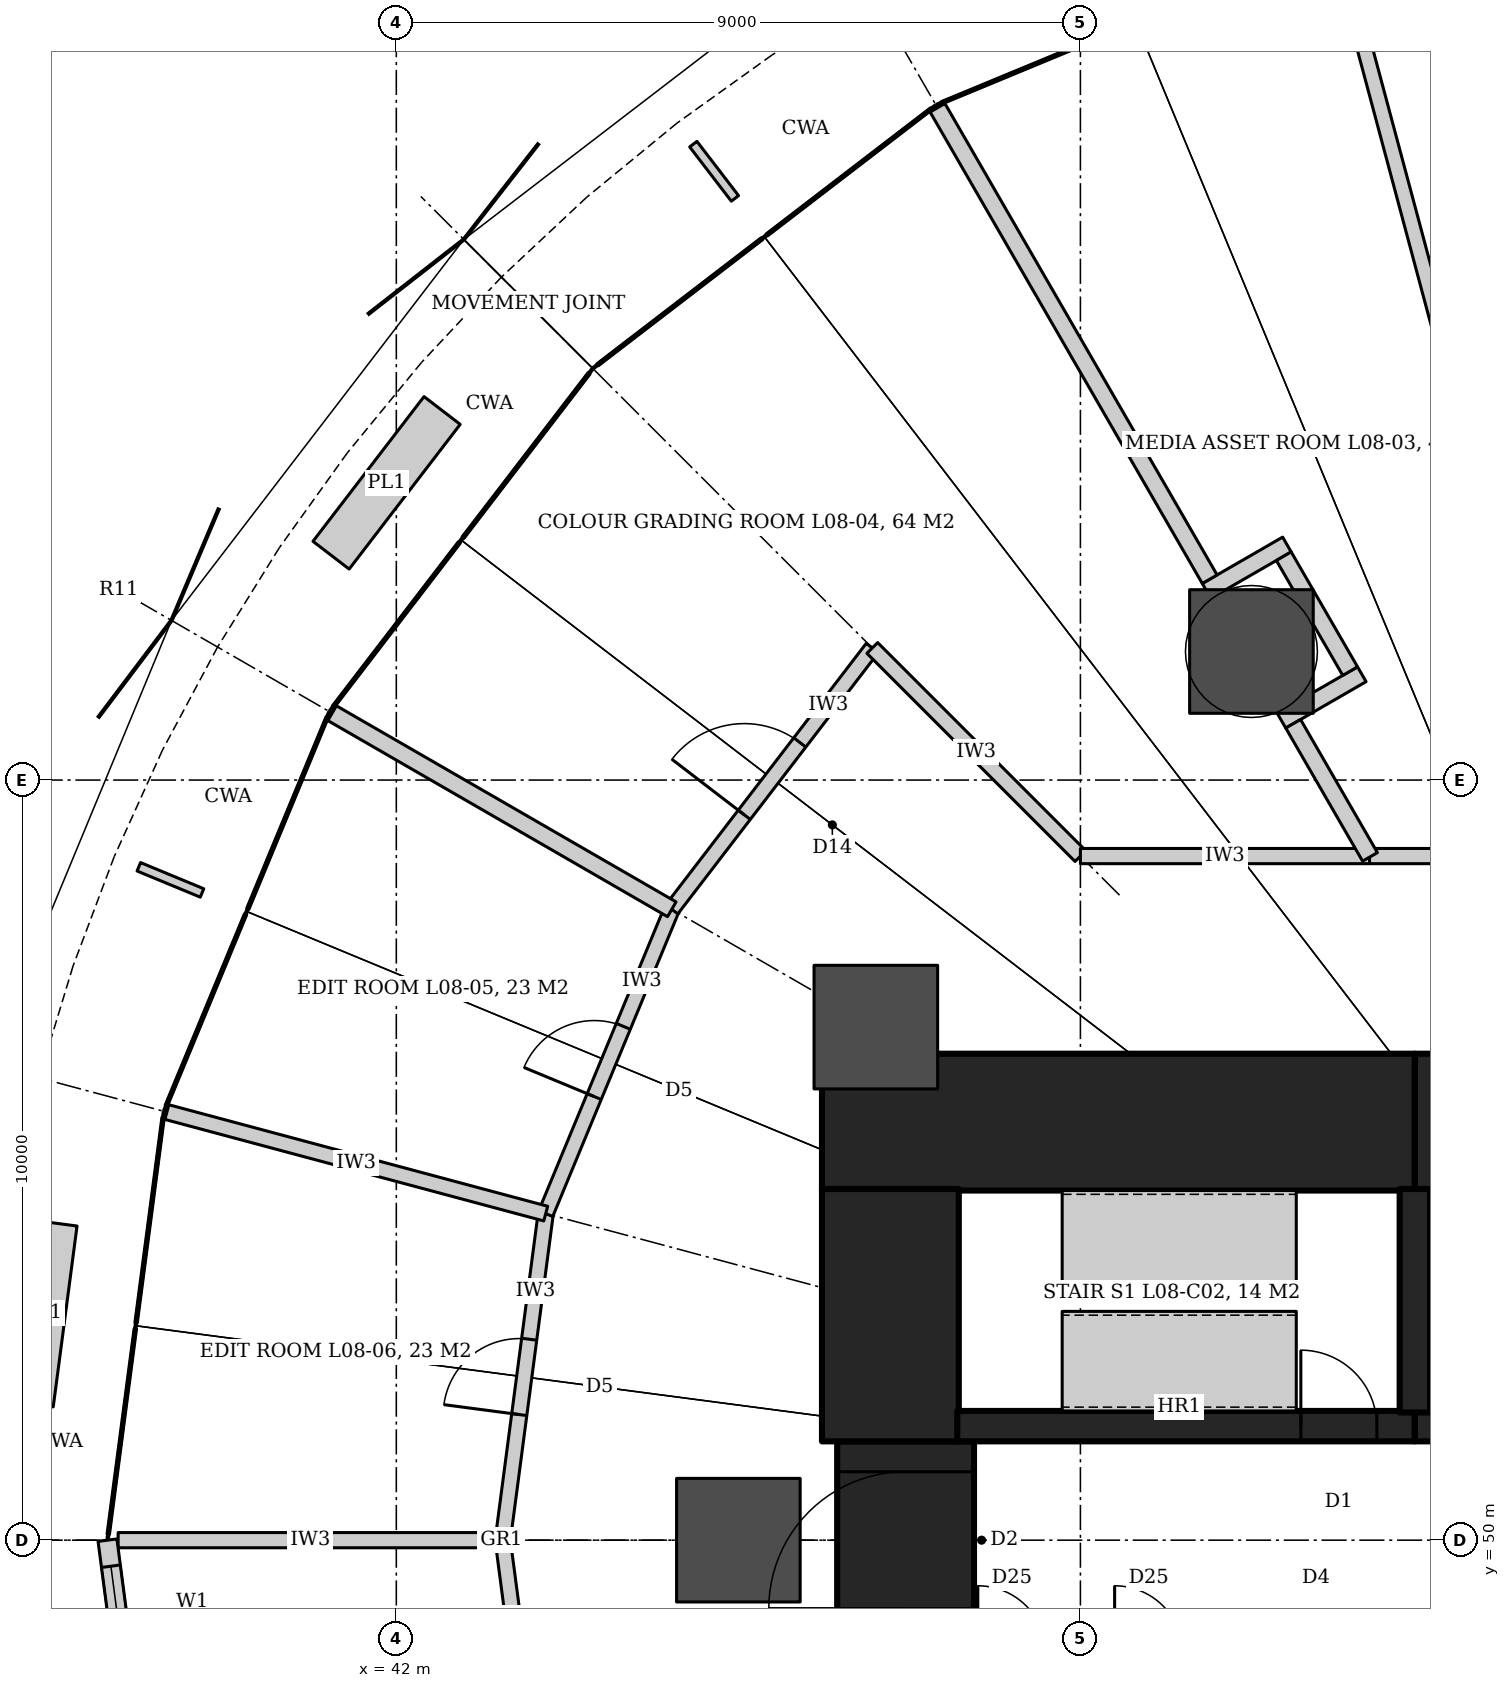
"""IFC4 building model, lengths in metres.
Left out: names, types, materials, properties, quantities, classifications, styles, units other than length and angle.
Written with IfcOpenShell. Run it as: python <this file> out.ifc"""

import sys

from ifc_helpers import new_model, si_unit, direction, frame, frame_2d, origin, origin_2d, place, context, subcontext, project, spatial, rectangle, hollow_circle, extrude, element, fill, save


model = new_model("IFC4")
c1 = context("Model", 3, precision=1e-05, world=origin(), true_north=direction((0.0, 1.0)))
c2 = subcontext(c1, "Body", "Model", "MODEL_VIEW")
j1 = project(units=[si_unit("LENGTHUNIT", "METRE"), si_unit("PLANEANGLEUNIT", "RADIAN")], contexts=[c1])
p1 = place(None, origin())
s1 = spatial("IfcSite", under=j1, at=p1, CompositionType="ELEMENT")
p2 = place(p1, origin())
s2 = spatial("IfcBuilding", under=s1, at=p2, CompositionType="ELEMENT")
p3 = place(p2, frame((0.0, 0.0, 42.8)))
s3 = spatial("IfcBuildingStorey", under=s2, at=p3, CompositionType="ELEMENT", Elevation=42.8)
p4 = place(p3, frame((47.6, 55.5, 0.0), z_axis=(0.0, 0.0, 1.0), x_axis=(1.0, 0.0, 0.0)))
e1 = element("IfcWall", 1, at=p4, inside=s3, PredefinedType="SHEAR", context=c2, shape_type="SweptSolid", body=[
    extrude(rectangle(XDim=7.8, YDim=1.8, at=frame_2d((3.9, 0.0))), origin(), (0.0, 0.0, 1.0), 4.2),
])
p5 = place(p3, frame((55.4, 55.5, 0.0), z_axis=(0.0, 0.0, 1.0), x_axis=(1.0, 0.0, 0.0)))
e2 = element("IfcWall", 2, at=p5, inside=s3, PredefinedType="SHEAR", context=c2, shape_type="SweptSolid", body=[
    extrude(rectangle(XDim=9.2, YDim=1.8, at=frame_2d((4.6, 0.0))), origin(), (0.0, 0.0, 1.0), 4.2),
])
p6 = place(p3, frame((48.7, 48.7, 0.0), z_axis=(0.0, 0.0, 1.0), x_axis=(0.0, 1.0, 0.0)))
e3 = element("IfcWall", 3, at=p6, inside=s3, PredefinedType="SHEAR", context=c2, shape_type="SweptSolid", body=[
    extrude(rectangle(XDim=2.6, YDim=1.8, at=frame_2d((1.3, 0.0))), origin(), (0.0, 0.0, 1.0), 4.2),
])
p7 = place(p6, frame((0.4, 0.0, 0.0)))
e4 = element("IfcOpeningElement", 4, at=p7, cuts=e3, PredefinedType="OPENING", context=c2, shape_type="SweptSolid", body=[
    extrude(rectangle(XDim=1.8, YDim=2.1, at=frame_2d((0.9, 1.05))), frame((0.0, 0.91, 0.0), z_axis=(0.0, -1.0, 0.0), x_axis=(1.0, 0.0, 0.0)), (0.0, 0.0, 1.0), 1.82),
])
p8 = place(p3, frame((48.5, 51.3, 0.0), z_axis=(0.0, 0.0, 1.0), x_axis=(0.0, 1.0, 0.0)))
e5 = element("IfcWall", 5, at=p8, inside=s3, PredefinedType="SHEAR", context=c2, shape_type="SweptSolid", body=[
    extrude(rectangle(XDim=3.32, YDim=1.8, at=frame_2d((1.66, 0.0))), origin(), (0.0, 0.0, 1.0), 4.2),
])
p9 = place(p3, frame((49.38, 51.5, 0.0), z_axis=(0.0, 0.0, 1.0), x_axis=(1.0, 0.0, 0.0)))
e6 = element("IfcWall", 6, at=p9, inside=s3, PredefinedType="SHEAR", context=c2, shape_type="SweptSolid", body=[
    extrude(rectangle(XDim=6.02, YDim=0.4, at=frame_2d((3.01, 0.0))), origin(), (0.0, 0.0, 1.0), 4.2),
])
p10 = place(p9, frame((4.52, 0.0, 0.0)))
e7 = element("IfcOpeningElement", 7, at=p10, cuts=e6, PredefinedType="OPENING", context=c2, shape_type="SweptSolid", body=[
    extrude(rectangle(XDim=1.0, YDim=2.1, at=frame_2d((0.5, 1.05))), frame((0.0, 0.21, 0.0), z_axis=(0.0, -1.0, 0.0), x_axis=(1.0, 0.0, 0.0)), (0.0, 0.0, 1.0), 0.42),
])
p11 = place(p3, frame((55.4, 51.5, 0.0), z_axis=(0.0, 0.0, 1.0), x_axis=(1.0, 0.0, 0.0)))
e8 = element("IfcWall", 8, at=p11, inside=s3, PredefinedType="SHEAR", context=c2, shape_type="SweptSolid", body=[
    extrude(rectangle(XDim=9.2, YDim=0.4, at=frame_2d((4.6, 0.0))), origin(), (0.0, 0.0, 1.0), 4.2),
])
p12 = place(p11, frame((0.6, 0.0, 0.0)))
e9 = element("IfcOpeningElement", 9, at=p12, cuts=e8, PredefinedType="OPENING", context=c2, shape_type="SweptSolid", body=[
    extrude(rectangle(XDim=1.1, YDim=2.1, at=frame_2d((0.55, 1.05))), frame((0.0, 0.21, 0.0), z_axis=(0.0, -1.0, 0.0), x_axis=(1.0, 0.0, 0.0)), (0.0, 0.0, 1.0), 0.42),
])
p13 = place(p11, frame((2.9, 0.0, 0.0)))
e10 = element("IfcOpeningElement", 10, at=p13, cuts=e8, PredefinedType="OPENING", context=c2, shape_type="SweptSolid", body=[
    extrude(rectangle(XDim=1.1, YDim=2.1, at=frame_2d((0.55, 1.05))), frame((0.0, 0.21, 0.0), z_axis=(0.0, -1.0, 0.0), x_axis=(1.0, 0.0, 0.0)), (0.0, 0.0, 1.0), 0.42),
])
p14 = place(p11, frame((5.2, 0.0, 0.0)))
e11 = element("IfcOpeningElement", 11, at=p14, cuts=e8, PredefinedType="OPENING", context=c2, shape_type="SweptSolid", body=[
    extrude(rectangle(XDim=1.1, YDim=2.1, at=frame_2d((0.55, 1.05))), frame((0.0, 0.21, 0.0), z_axis=(0.0, -1.0, 0.0), x_axis=(1.0, 0.0, 0.0)), (0.0, 0.0, 1.0), 0.42),
])
p15 = place(p11, frame((7.5, 0.0, 0.0)))
e12 = element("IfcOpeningElement", 12, at=p15, cuts=e8, PredefinedType="OPENING", context=c2, shape_type="SweptSolid", body=[
    extrude(rectangle(XDim=1.1, YDim=2.1, at=frame_2d((0.55, 1.05))), frame((0.0, 0.21, 0.0), z_axis=(0.0, -1.0, 0.0), x_axis=(1.0, 0.0, 0.0)), (0.0, 0.0, 1.0), 0.42),
])
p16 = place(p3, frame((55.4, 51.68, 0.0), z_axis=(0.0, 0.0, 1.0), x_axis=(0.0, 1.0, 0.0)))
e13 = element("IfcWall", 13, at=p16, inside=s3, PredefinedType="SHEAR", context=c2, shape_type="SweptSolid", body=[
    extrude(rectangle(XDim=2.94, YDim=0.4, at=frame_2d((1.47, 0.0))), origin(), (0.0, 0.0, 1.0), 4.2),
])
for number, where, z_axis, x_axis in (
    (14, (53.25, 61.691, 0.0), (0.0, 0.0, 1.0), (1.0, 0.0, 0.0)),
    (15, (48.309, 56.75, 0.0), (0.0, 0.0, 1.0), (1.0, 0.0, 0.0)),
    (16, (46.5, 50.0, 0.0), (0.0, 0.0, 1.0), (1.0, 0.0, 0.0)),
):
    element("IfcColumn", number, at=place(p3, frame(where, z_axis=z_axis, x_axis=x_axis)), inside=s3, PredefinedType="COLUMN", context=c2, shape_type="SweptSolid", body=[
        extrude(hollow_circle(Radius=0.813, WallThickness=0.08, at=origin_2d()), origin(), (0.0, 0.0, 1.0), 4.2),
    ])
p17 = place(p3, frame((43.966, 45.704, 0.0), z_axis=(0.0, 0.0, 1.0), x_axis=(-0.130536124221, 0.99144355375, 0.0)))
e17 = element("IfcWall", 17, at=p17, inside=s3, PredefinedType="PARTITIONING", context=c2, shape_type="SweptSolid", body=[
    extrude(rectangle(XDim=4.333, YDim=0.2, at=frame_2d((2.167, 0.0))), origin(), (0.0, 0.0, 1.0), 3.04),
])
p18 = place(p17, frame((1.667, 0.0, 0.0)))
e18 = element("IfcOpeningElement", 18, at=p18, cuts=e17, PredefinedType="OPENING", context=c2, shape_type="SweptSolid", body=[
    extrude(rectangle(XDim=1.0, YDim=2.1, at=frame_2d((0.5, 1.05))), frame((0.0, 0.11, 0.0), z_axis=(0.0, -1.0, 0.0), x_axis=(1.0, 0.0, 0.0)), (0.0, 0.0, 1.0), 0.22),
])
p19 = place(p3, frame((43.4, 50.0, 0.0), z_axis=(0.0, 0.0, 1.0), x_axis=(0.130536124221, 0.99144355375, 0.0)))
e19 = element("IfcWall", 19, at=p19, inside=s3, PredefinedType="PARTITIONING", context=c2, shape_type="SweptSolid", body=[
    extrude(rectangle(XDim=4.333, YDim=0.2, at=frame_2d((2.167, 0.0))), origin(), (0.0, 0.0, 1.0), 3.04),
])
p20 = place(p19, frame((1.667, 0.0, 0.0)))
e20 = element("IfcOpeningElement", 20, at=p20, cuts=e19, PredefinedType="OPENING", context=c2, shape_type="SweptSolid", body=[
    extrude(rectangle(XDim=1.0, YDim=2.1, at=frame_2d((0.5, 1.05))), frame((0.0, 0.11, 0.0), z_axis=(0.0, -1.0, 0.0), x_axis=(1.0, 0.0, 0.0)), (0.0, 0.0, 1.0), 0.22),
])
p21 = place(p3, frame((43.966, 54.296, 0.0), z_axis=(0.0, 0.0, 1.0), x_axis=(0.382698425325, 0.923873322082, 0.0)))
e21 = element("IfcWall", 21, at=p21, inside=s3, PredefinedType="PARTITIONING", context=c2, shape_type="SweptSolid", body=[
    extrude(rectangle(XDim=4.333, YDim=0.2, at=frame_2d((2.167, 0.0))), origin(), (0.0, 0.0, 1.0), 3.04),
])
p22 = place(p21, frame((1.667, 0.0, 0.0)))
e22 = element("IfcOpeningElement", 22, at=p22, cuts=e21, PredefinedType="OPENING", context=c2, shape_type="SweptSolid", body=[
    extrude(rectangle(XDim=1.0, YDim=2.1, at=frame_2d((0.5, 1.05))), frame((0.0, 0.11, 0.0), z_axis=(0.0, -1.0, 0.0), x_axis=(1.0, 0.0, 0.0)), (0.0, 0.0, 1.0), 0.22),
])
p23 = place(p3, frame((45.624, 58.3, 0.0), z_axis=(0.0, 0.0, 1.0), x_axis=(0.60874374674, 0.79336690806, 0.0)))
e23 = element("IfcWall", 23, at=p23, inside=s3, PredefinedType="PARTITIONING", context=c2, shape_type="SweptSolid", body=[
    extrude(rectangle(XDim=4.333, YDim=0.2, at=frame_2d((2.167, 0.0))), origin(), (0.0, 0.0, 1.0), 3.04),
])
p24 = place(p23, frame((1.567, 0.0, 0.0)))
e24 = element("IfcOpeningElement", 24, at=p24, cuts=e23, PredefinedType="OPENING", context=c2, shape_type="SweptSolid", body=[
    extrude(rectangle(XDim=1.2, YDim=2.4, at=frame_2d((0.6, 1.2))), frame((0.0, 0.11, 0.0), z_axis=(0.0, -1.0, 0.0), x_axis=(1.0, 0.0, 0.0)), (0.0, 0.0, 1.0), 0.22),
])
p25 = place(p3, frame((48.262, 61.738, 0.0), z_axis=(0.0, 0.0, 1.0), x_axis=(0.707106781187, -0.707106781187, 0.0)))
e25 = element("IfcWall", 25, at=p25, inside=s3, PredefinedType="PARTITIONING", context=c2, shape_type="SweptSolid", body=[
    extrude(rectangle(XDim=3.872, YDim=0.2, at=frame_2d((1.936, 0.0))), origin(), (0.0, 0.0, 1.0), 3.02),
])
p26 = place(p3, frame((51.0, 59.0, 0.0), z_axis=(0.0, 0.0, 1.0), x_axis=(1.0, 0.0, 0.0)))
e26 = element("IfcWall", 26, at=p26, inside=s3, PredefinedType="PARTITIONING", context=c2, shape_type="SweptSolid", body=[
    extrude(rectangle(XDim=3.804, YDim=0.2, at=frame_2d((1.902, 0.0))), origin(), (0.0, 0.0, 1.0), 3.02),
])
p27 = place(p3, frame((54.804, 59.0, 0.0), z_axis=(0.0, 0.0, 1.0), x_axis=(1.0, 0.0, 0.0)))
e27 = element("IfcWall", 27, at=p27, inside=s3, PredefinedType="PARTITIONING", context=c2, shape_type="SweptSolid", body=[
    extrude(rectangle(XDim=2.785, YDim=0.2, at=frame_2d((1.392, 0.0))), origin(), (0.0, 0.0, 1.0), 3.04),
])
p28 = place(p27, frame((0.892, 0.0, 0.0)))
e28 = element("IfcOpeningElement", 28, at=p28, cuts=e27, PredefinedType="OPENING", context=c2, shape_type="SweptSolid", body=[
    extrude(rectangle(XDim=1.0, YDim=2.1, at=frame_2d((0.5, 1.05))), frame((0.0, 0.11, 0.0), z_axis=(0.0, -1.0, 0.0), x_axis=(1.0, 0.0, 0.0)), (0.0, 0.0, 1.0), 0.22),
])
p29 = place(p3, frame((57.588, 59.002, 0.0), z_axis=(0.0, 0.0, 1.0), x_axis=(-0.258817505218, 0.965926238899, 0.0)))
e29 = element("IfcWall", 29, at=p29, inside=s3, PredefinedType="PARTITIONING", context=c2, shape_type="SweptSolid", body=[
    extrude(rectangle(XDim=12.34, YDim=0.2, at=frame_2d((6.17, 0.0))), origin(), (0.0, 0.0, 1.0), 3.02),
])
p30 = place(p3, frame((53.645, 60.781, 0.0), z_axis=(0.0, 0.0, 1.0), x_axis=(0.866019052629, 0.500011000363, 0.0)))
e30 = element("IfcWall", 30, at=p30, inside=s3, PredefinedType="PARTITIONING", context=c2, shape_type="SweptSolid", body=[
    extrude(rectangle(XDim=1.221, YDim=0.225, at=frame_2d((0.61, 0.0))), origin(), (0.0, 0.0, 1.0), 3.02),
])
p31 = place(p3, frame((52.66, 62.489, 0.0), z_axis=(0.0, 0.0, 1.0), x_axis=(0.865969036334, 0.500097618581, 0.0)))
e31 = element("IfcWall", 31, at=p31, inside=s3, PredefinedType="PARTITIONING", context=c2, shape_type="SweptSolid", body=[
    extrude(rectangle(XDim=1.22, YDim=0.225, at=frame_2d((0.61, 0.0))), origin(), (0.0, 0.0, 1.0), 3.02),
])
p32 = place(p3, frame((54.549, 61.433, 0.0), z_axis=(0.0, 0.0, 1.0), x_axis=(-0.500049268192, 0.865996956912, 0.0)))
e32 = element("IfcWall", 32, at=p32, inside=s3, PredefinedType="PARTITIONING", context=c2, shape_type="SweptSolid", body=[
    extrude(rectangle(XDim=1.746, YDim=0.225, at=frame_2d((0.873, 0.0))), origin(), (0.0, 0.0, 1.0), 3.02),
])
p33 = place(p3, frame((54.81, 58.989, 0.0), z_axis=(0.0, 0.0, 1.0), x_axis=(-0.499969802211, 0.866042837784, 0.0)))
e33 = element("IfcWall", 33, at=p33, inside=s3, PredefinedType="PARTITIONING", context=c2, shape_type="SweptSolid", body=[
    extrude(rectangle(XDim=2.022, YDim=0.225, at=frame_2d((1.011, 0.0))), origin(), (0.0, 0.0, 1.0), 3.04),
])
p34 = place(p3, frame((52.701, 62.642, 0.0), z_axis=(0.0, 0.0, 1.0), x_axis=(-0.499970319043, 0.866042539415, 0.0)))
e34 = element("IfcWall", 34, at=p34, inside=s3, PredefinedType="PARTITIONING", context=c2, shape_type="SweptSolid", body=[
    extrude(rectangle(XDim=7.162, YDim=0.225, at=frame_2d((3.581, 0.0))), origin(), (0.0, 0.0, 1.0), 3.04),
])
p35 = place(p3, frame((45.624, 58.3, 0.0), z_axis=(0.0, 0.0, 1.0), x_axis=(-0.866042189445, 0.499970925255, 0.0)))
e35 = element("IfcWall", 35, at=p35, inside=s3, PredefinedType="PARTITIONING", context=c2, shape_type="SweptSolid", body=[
    extrude(rectangle(XDim=5.16, YDim=0.225, at=frame_2d((2.58, 0.0))), origin(), (0.0, 0.0, 1.0), 3.04),
])
p36 = place(p3, frame((43.966, 54.296, 0.0), z_axis=(0.0, 0.0, 1.0), x_axis=(-0.965927988102, 0.258810976974, 0.0)))
e36 = element("IfcWall", 36, at=p36, inside=s3, PredefinedType="PARTITIONING", context=c2, shape_type="SweptSolid", body=[
    extrude(rectangle(XDim=5.16, YDim=0.2, at=frame_2d((2.58, 0.0))), origin(), (0.0, 0.0, 1.0), 3.04),
])
p37 = place(p3, frame((43.4, 50.0, 0.0), z_axis=(0.0, 0.0, 1.0), x_axis=(-1.0, 0.0, 0.0)))
e37 = element("IfcWall", 37, at=p37, inside=s3, PredefinedType="PARTITIONING", context=c2, shape_type="SweptSolid", body=[
    extrude(rectangle(XDim=5.06, YDim=0.2, at=frame_2d((2.53, 0.0))), origin(), (0.0, 0.0, 1.0), 3.04),
])
p38 = place(p3, frame((38.2, 50.0, 0.0), z_axis=(0.0, 0.0, 1.0), x_axis=(0.130542179395, -0.991442756491, 0.0)))
e38 = element("IfcWall", 38, at=p38, inside=s3, PredefinedType="SOLIDWALL", context=c2, shape_type="SweptSolid", body=[
    extrude(rectangle(XDim=5.691, YDim=0.25, at=frame_2d((2.845, 0.0))), origin(), (0.0, 0.0, 1.0), 4.04),
])
p39 = place(p38, frame((1.946, 0.0, 0.0)))
e39 = element("IfcOpeningElement", 39, at=p39, cuts=e38, PredefinedType="OPENING", context=c2, shape_type="SweptSolid", body=[
    extrude(rectangle(XDim=1.8, YDim=2.4, at=frame_2d((0.9, 1.2))), frame((0.0, 0.135, 0.0), z_axis=(0.0, -1.0, 0.0), x_axis=(1.0, 0.0, 0.0)), (0.0, 0.0, 1.0), 0.27),
])
p40 = place(p38, frame((0.345, 0.0, 0.0)))
e40 = element("IfcOpeningElement", 40, at=p40, cuts=e38, PredefinedType="OPENING", context=c2, shape_type="SweptSolid", body=[
    extrude(rectangle(XDim=1.2, YDim=2.4, at=frame_2d((0.6, 1.2))), frame((0.0, 0.135, 0.0), z_axis=(0.0, -1.0, 0.0), x_axis=(1.0, 0.0, 0.0)), (0.0, 0.0, 1.0), 0.27),
])
p41 = place(p38, frame((4.146, 0.0, 0.0)))
e41 = element("IfcOpeningElement", 41, at=p41, cuts=e38, PredefinedType="OPENING", context=c2, shape_type="SweptSolid", body=[
    extrude(rectangle(XDim=1.2, YDim=2.4, at=frame_2d((0.6, 1.2))), frame((0.0, 0.135, 0.0), z_axis=(0.0, -1.0, 0.0), x_axis=(1.0, 0.0, 0.0)), (0.0, 0.0, 1.0), 0.27),
])
p42 = place(p24, origin())
e42 = element("IfcDoor", 42, at=p42, inside=s3, OperationType="SINGLE_SWING_LEFT", PredefinedType="DOOR", context=c2, shape_type="SweptSolid", body=[
    extrude(rectangle(XDim=1.2, YDim=2.4, at=frame_2d((0.6, 1.2))), frame((0.0, 0.025, 0.0), z_axis=(0.0, -1.0, 0.0), x_axis=(1.0, 0.0, 0.0)), (0.0, 0.0, 1.0), 0.05),
])
fill(e24, e42)
p43 = place(p22, origin())
e43 = element("IfcDoor", 43, at=p43, inside=s3, OperationType="SINGLE_SWING_LEFT", PredefinedType="DOOR", context=c2, shape_type="SweptSolid", body=[
    extrude(rectangle(XDim=1.0, YDim=2.1, at=frame_2d((0.5, 1.05))), frame((0.0, 0.025, 0.0), z_axis=(0.0, -1.0, 0.0), x_axis=(1.0, 0.0, 0.0)), (0.0, 0.0, 1.0), 0.05),
])
fill(e22, e43)
p44 = place(p20, origin())
e44 = element("IfcDoor", 44, at=p44, inside=s3, OperationType="SINGLE_SWING_LEFT", PredefinedType="DOOR", context=c2, shape_type="SweptSolid", body=[
    extrude(rectangle(XDim=1.0, YDim=2.1, at=frame_2d((0.5, 1.05))), frame((0.0, 0.025, 0.0), z_axis=(0.0, -1.0, 0.0), x_axis=(1.0, 0.0, 0.0)), (0.0, 0.0, 1.0), 0.05),
])
fill(e20, e44)
p45 = place(p40, origin())
e45 = element("IfcWindow", 45, at=p45, inside=s3, PartitioningType="SINGLE_PANEL", PredefinedType="WINDOW", context=c2, shape_type="SweptSolid", body=[
    extrude(rectangle(XDim=1.2, YDim=2.4, at=frame_2d((0.6, 1.2))), frame((0.0, 0.03, 0.0), z_axis=(0.0, -1.0, 0.0), x_axis=(1.0, 0.0, 0.0)), (0.0, 0.0, 1.0), 0.06),
])
fill(e40, e45)
p46 = place(p10, origin())
e46 = element("IfcDoor", 46, at=p46, inside=s3, OperationType="SINGLE_SWING_LEFT", PredefinedType="DOOR", context=c2, shape_type="SweptSolid", body=[
    extrude(rectangle(XDim=1.0, YDim=2.1, at=frame_2d((0.5, 1.05))), frame((0.0, 0.025, 0.0), z_axis=(0.0, -1.0, 0.0), x_axis=(1.0, 0.0, 0.0)), (0.0, 0.0, 1.0), 0.05),
])
fill(e7, e46)
p47 = place(p7, origin())
e47 = element("IfcDoor", 47, at=p47, inside=s3, OperationType="DOUBLE_DOOR_DOUBLE_SWING", PredefinedType="DOOR", context=c2, shape_type="SweptSolid", body=[
    extrude(rectangle(XDim=1.8, YDim=2.1, at=frame_2d((0.9, 1.05))), frame((0.0, 0.025, 0.0), z_axis=(0.0, -1.0, 0.0), x_axis=(1.0, 0.0, 0.0)), (0.0, 0.0, 1.0), 0.05),
])
fill(e4, e47)
save(model, sys.argv[1])
